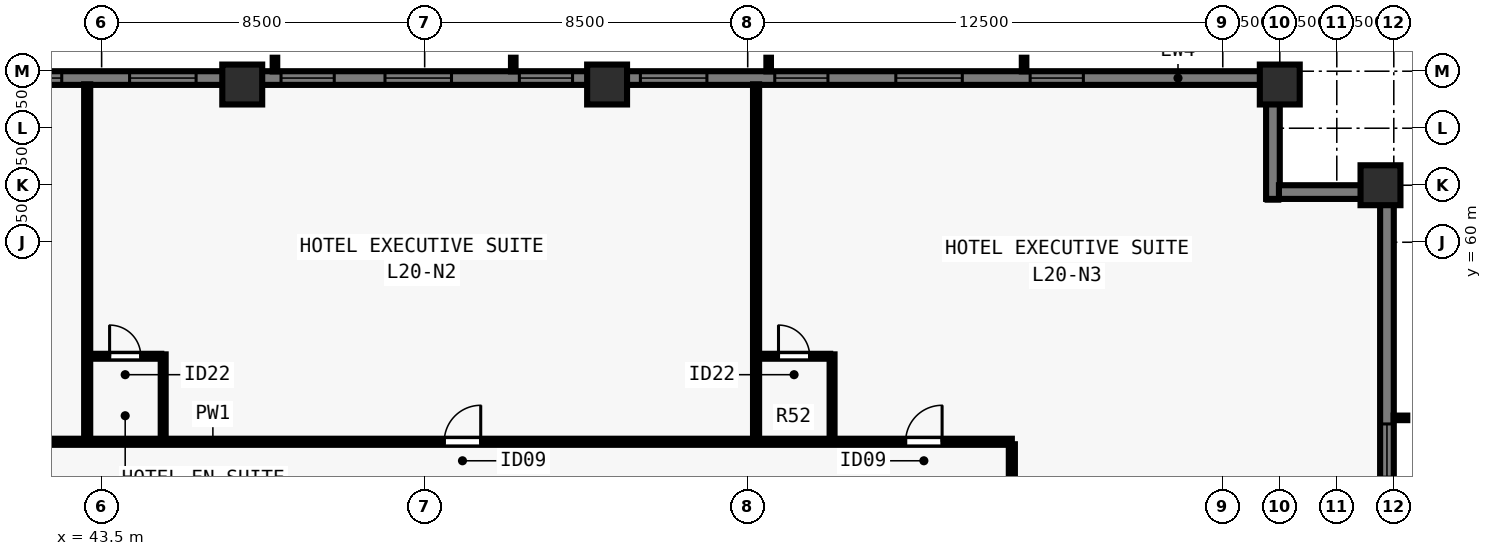
"""IFC4 building model, lengths in metres.
Left out: names, types, materials, properties, quantities, classifications, styles, units other than length and angle.
Written with IfcOpenShell. Run it as: python <this file> out.ifc"""

import sys

from ifc_helpers import new_model, si_unit, direction, frame, frame_2d, origin, origin_2d, place, context, subcontext, project, spatial, rectangle, extrude, element, fill, save


model = new_model("IFC4")
c1 = context("Model", 3, precision=1e-05, world=origin(), true_north=direction((0.0, 1.0)))
c2 = subcontext(c1, "Body", "Model", "MODEL_VIEW")
j1 = project(units=[si_unit("LENGTHUNIT", "METRE"), si_unit("PLANEANGLEUNIT", "RADIAN")], contexts=[c1])
p1 = place(None, origin())
s1 = spatial("IfcSite", under=j1, at=p1, CompositionType="ELEMENT")
p2 = place(p1, origin())
s2 = spatial("IfcBuilding", under=s1, at=p2, CompositionType="ELEMENT")
p3 = place(p2, frame((0.0, 0.0, 76.0)))
s3 = spatial("IfcBuildingStorey", under=s2, at=p3, CompositionType="ELEMENT", Elevation=76.0)
for number, where, z_axis, x_axis in (
    (1, (77.15, 61.5, 0.0), (0.0, 0.0, 1.0), (0.0, 1.0, 0.0)),
    (2, (74.5, 64.15, 0.0), (0.0, 0.0, 1.0), (1.0, 0.0, 0.0)),
    (3, (56.8, 64.15, 0.0), (0.0, 0.0, 1.0), (1.0, 0.0, 0.0)),
    (4, (47.2, 64.15, 0.0), (0.0, 0.0, 1.0), (1.0, 0.0, 0.0)),
):
    element("IfcColumn", number, at=place(p3, frame(where, z_axis=z_axis, x_axis=x_axis)), inside=s3, PredefinedType="COLUMN", context=c2, shape_type="SweptSolid", body=[
        extrude(rectangle(XDim=1.05, YDim=1.05, at=origin_2d()), origin(), (0.0, 0.0, 1.0), 3.5),
    ])
p4 = place(p3, frame((29.5, 64.32, 0.0), z_axis=(0.0, 0.0, 1.0), x_axis=(1.0, 0.0, 0.0)))
e5 = element("IfcWall", 5, at=p4, inside=s3, PredefinedType="SOLIDWALL", context=c2, shape_type="SweptSolid", body=[
    extrude(rectangle(XDim=44.662, YDim=0.36, at=frame_2d((22.331, 0.0))), origin(), (0.0, 0.0, 1.0), 3.28),
])
p5 = place(p4, frame((4.83, 0.0, 0.8)))
e6 = element("IfcOpeningElement", 6, at=p5, cuts=e5, PredefinedType="OPENING", context=c2, shape_type="SweptSolid", body=[
    extrude(rectangle(XDim=1.4, YDim=1.544, at=frame_2d((0.7, 0.772))), frame((0.0, 0.19, 0.0), z_axis=(0.0, -1.0, 0.0), x_axis=(1.0, 0.0, 0.0)), (0.0, 0.0, 1.0), 0.38),
])
p6 = place(p4, frame((8.015, 0.0, 0.8)))
e7 = element("IfcOpeningElement", 7, at=p6, cuts=e5, PredefinedType="OPENING", context=c2, shape_type="SweptSolid", body=[
    extrude(rectangle(XDim=1.75, YDim=1.544, at=frame_2d((0.875, 0.772))), frame((0.0, 0.19, 0.0), z_axis=(0.0, -1.0, 0.0), x_axis=(1.0, 0.0, 0.0)), (0.0, 0.0, 1.0), 0.38),
])
p7 = place(p4, frame((11.551, 0.0, 0.8)))
e8 = element("IfcOpeningElement", 8, at=p7, cuts=e5, PredefinedType="OPENING", context=c2, shape_type="SweptSolid", body=[
    extrude(rectangle(XDim=1.4, YDim=1.544, at=frame_2d((0.7, 0.772))), frame((0.0, 0.19, 0.0), z_axis=(0.0, -1.0, 0.0), x_axis=(1.0, 0.0, 0.0)), (0.0, 0.0, 1.0), 0.38),
])
p8 = place(p4, frame((14.736, 0.0, 0.8)))
e9 = element("IfcOpeningElement", 9, at=p8, cuts=e5, PredefinedType="OPENING", context=c2, shape_type="SweptSolid", body=[
    extrude(rectangle(XDim=1.75, YDim=1.544, at=frame_2d((0.875, 0.772))), frame((0.0, 0.19, 0.0), z_axis=(0.0, -1.0, 0.0), x_axis=(1.0, 0.0, 0.0)), (0.0, 0.0, 1.0), 0.38),
])
p9 = place(p4, frame((18.721, 0.0, 0.8)))
e10 = element("IfcOpeningElement", 10, at=p9, cuts=e5, PredefinedType="OPENING", context=c2, shape_type="SweptSolid", body=[
    extrude(rectangle(XDim=1.4, YDim=1.544, at=frame_2d((0.7, 0.772))), frame((0.0, 0.19, 0.0), z_axis=(0.0, -1.0, 0.0), x_axis=(1.0, 0.0, 0.0)), (0.0, 0.0, 1.0), 0.38),
])
p10 = place(p4, frame((21.456, 0.0, 0.8)))
e11 = element("IfcOpeningElement", 11, at=p10, cuts=e5, PredefinedType="OPENING", context=c2, shape_type="SweptSolid", body=[
    extrude(rectangle(XDim=1.75, YDim=1.544, at=frame_2d((0.875, 0.772))), frame((0.0, 0.19, 0.0), z_axis=(0.0, -1.0, 0.0), x_axis=(1.0, 0.0, 0.0)), (0.0, 0.0, 1.0), 0.38),
])
p11 = place(p4, frame((24.991, 0.0, 0.8)))
e12 = element("IfcOpeningElement", 12, at=p11, cuts=e5, PredefinedType="OPENING", context=c2, shape_type="SweptSolid", body=[
    extrude(rectangle(XDim=1.4, YDim=1.544, at=frame_2d((0.7, 0.772))), frame((0.0, 0.19, 0.0), z_axis=(0.0, -1.0, 0.0), x_axis=(1.0, 0.0, 0.0)), (0.0, 0.0, 1.0), 0.38),
])
p12 = place(p4, frame((28.177, 0.0, 0.8)))
e13 = element("IfcOpeningElement", 13, at=p12, cuts=e5, PredefinedType="OPENING", context=c2, shape_type="SweptSolid", body=[
    extrude(rectangle(XDim=1.75, YDim=1.544, at=frame_2d((0.875, 0.772))), frame((0.0, 0.19, 0.0), z_axis=(0.0, -1.0, 0.0), x_axis=(1.0, 0.0, 0.0)), (0.0, 0.0, 1.0), 0.38),
])
p13 = place(p4, frame((31.711, 0.0, 0.8)))
e14 = element("IfcOpeningElement", 14, at=p13, cuts=e5, PredefinedType="OPENING", context=c2, shape_type="SweptSolid", body=[
    extrude(rectangle(XDim=1.4, YDim=1.544, at=frame_2d((0.7, 0.772))), frame((0.0, 0.19, 0.0), z_axis=(0.0, -1.0, 0.0), x_axis=(1.0, 0.0, 0.0)), (0.0, 0.0, 1.0), 0.38),
])
p14 = place(p4, frame((34.897, 0.0, 0.8)))
e15 = element("IfcOpeningElement", 15, at=p14, cuts=e5, PredefinedType="OPENING", context=c2, shape_type="SweptSolid", body=[
    extrude(rectangle(XDim=1.75, YDim=1.544, at=frame_2d((0.875, 0.772))), frame((0.0, 0.19, 0.0), z_axis=(0.0, -1.0, 0.0), x_axis=(1.0, 0.0, 0.0)), (0.0, 0.0, 1.0), 0.38),
])
p15 = place(p4, frame((38.432, 0.0, 0.8)))
e16 = element("IfcOpeningElement", 16, at=p15, cuts=e5, PredefinedType="OPENING", context=c2, shape_type="SweptSolid", body=[
    extrude(rectangle(XDim=1.4, YDim=1.544, at=frame_2d((0.7, 0.772))), frame((0.0, 0.19, 0.0), z_axis=(0.0, -1.0, 0.0), x_axis=(1.0, 0.0, 0.0)), (0.0, 0.0, 1.0), 0.38),
])
p16 = place(p3, frame((74.32, 64.5, 0.0), z_axis=(0.0, 0.0, 1.0), x_axis=(0.0, -1.0, 0.0)))
e17 = element("IfcWall", 17, at=p16, inside=s3, PredefinedType="SOLIDWALL", context=c2, shape_type="SweptSolid", body=[
    extrude(rectangle(XDim=3.36, YDim=0.36, at=frame_2d((1.68, 0.0))), origin(), (0.0, 0.0, 1.0), 3.28),
])
p17 = place(p3, frame((74.478, 61.32, 0.0), z_axis=(0.0, 0.0, 1.0), x_axis=(1.0, 0.0, 0.0)))
e18 = element("IfcWall", 18, at=p17, inside=s3, PredefinedType="SOLIDWALL", context=c2, shape_type="SweptSolid", body=[
    extrude(rectangle(XDim=2.684, YDim=0.36, at=frame_2d((1.342, 0.0))), origin(), (0.0, 0.0, 1.0), 3.28),
])
p18 = place(p3, frame((77.32, 61.5, 0.0), z_axis=(0.0, 0.0, 1.0), x_axis=(0.0, -1.0, 0.0)))
e19 = element("IfcWall", 19, at=p18, inside=s3, PredefinedType="SOLIDWALL", context=c2, shape_type="SweptSolid", body=[
    extrude(rectangle(XDim=11.362, YDim=0.36, at=frame_2d((5.681, 0.0))), origin(), (0.0, 0.0, 1.0), 3.28),
])
p19 = place(p18, frame((6.281, 0.0, 0.8)))
e20 = element("IfcOpeningElement", 20, at=p19, cuts=e19, PredefinedType="OPENING", context=c2, shape_type="SweptSolid", body=[
    extrude(rectangle(XDim=1.4, YDim=1.544, at=frame_2d((0.7, 0.772))), frame((0.0, 0.19, 0.0), z_axis=(0.0, -1.0, 0.0), x_axis=(1.0, 0.0, 0.0)), (0.0, 0.0, 1.0), 0.38),
])
p20 = place(p3, frame((36.55, 54.75, 0.0), z_axis=(0.0, 0.0, 1.0), x_axis=(1.0, 0.0, 0.0)))
e21 = element("IfcWall", 21, at=p20, inside=s3, PredefinedType="PARTITIONING", context=c2, shape_type="SweptSolid", body=[
    extrude(rectangle(XDim=30.9, YDim=0.16, at=frame_2d((15.45, 0.0))), origin(), (0.0, 0.0, 1.0), 3.28),
])
p21 = place(p20, frame((2.83, 0.0, 0.0)))
e22 = element("IfcOpeningElement", 22, at=p21, cuts=e21, PredefinedType="OPENING", context=c2, shape_type="SweptSolid", body=[
    extrude(rectangle(XDim=0.96, YDim=2.15, at=frame_2d((0.48, 1.075))), frame((0.0, 0.09, 0.0), z_axis=(0.0, -1.0, 0.0), x_axis=(1.0, 0.0, 0.0)), (0.0, 0.0, 1.0), 0.18),
])
p22 = place(p20, frame((15.965, 0.0, 0.0)))
e23 = element("IfcOpeningElement", 23, at=p22, cuts=e21, PredefinedType="OPENING", context=c2, shape_type="SweptSolid", body=[
    extrude(rectangle(XDim=0.96, YDim=2.15, at=frame_2d((0.48, 1.075))), frame((0.0, 0.09, 0.0), z_axis=(0.0, -1.0, 0.0), x_axis=(1.0, 0.0, 0.0)), (0.0, 0.0, 1.0), 0.18),
])
p23 = place(p20, frame((28.105, 0.0, 0.0)))
e24 = element("IfcOpeningElement", 24, at=p23, cuts=e21, PredefinedType="OPENING", context=c2, shape_type="SweptSolid", body=[
    extrude(rectangle(XDim=0.96, YDim=2.15, at=frame_2d((0.48, 1.075))), frame((0.0, 0.09, 0.0), z_axis=(0.0, -1.0, 0.0), x_axis=(1.0, 0.0, 0.0)), (0.0, 0.0, 1.0), 0.18),
])
p24 = place(p3, frame((67.45, 23.315, 0.0), z_axis=(0.0, 0.0, 1.0), x_axis=(0.0, 1.0, 0.0)))
e25 = element("IfcWall", 25, at=p24, inside=s3, PredefinedType="PARTITIONING", context=c2, shape_type="SweptSolid", body=[
    extrude(rectangle(XDim=31.37, YDim=0.16, at=frame_2d((15.685, 0.0))), origin(), (0.0, 0.0, 1.0), 3.28),
])
p25 = place(p24, frame((8.474, 0.0, 0.0)))
e26 = element("IfcOpeningElement", 26, at=p25, cuts=e25, PredefinedType="OPENING", context=c2, shape_type="SweptSolid", body=[
    extrude(rectangle(XDim=0.96, YDim=2.15, at=frame_2d((0.48, 1.075))), frame((0.0, 0.09, 0.0), z_axis=(0.0, -1.0, 0.0), x_axis=(1.0, 0.0, 0.0)), (0.0, 0.0, 1.0), 0.18),
])
p26 = place(p24, frame((23.974, 0.0, 0.0)))
e27 = element("IfcOpeningElement", 27, at=p26, cuts=e25, PredefinedType="OPENING", context=c2, shape_type="SweptSolid", body=[
    extrude(rectangle(XDim=0.96, YDim=2.15, at=frame_2d((0.48, 1.075))), frame((0.0, 0.09, 0.0), z_axis=(0.0, -1.0, 0.0), x_axis=(1.0, 0.0, 0.0)), (0.0, 0.0, 1.0), 0.18),
])
p27 = place(p3, frame((43.12, 54.815, 0.0), z_axis=(0.0, 0.0, 1.0), x_axis=(0.0, 1.0, 0.0)))
e28 = element("IfcWall", 28, at=p27, inside=s3, PredefinedType="PARTITIONING", context=c2, shape_type="SweptSolid", body=[
    extrude(rectangle(XDim=9.34, YDim=0.16, at=frame_2d((4.67, 0.0))), origin(), (0.0, 0.0, 1.0), 3.28),
])
p28 = place(p3, frame((45.12, 54.815, 0.0), z_axis=(0.0, 0.0, 1.0), x_axis=(0.0, 1.0, 0.0)))
e29 = element("IfcWall", 29, at=p28, inside=s3, PredefinedType="PLUMBINGWALL", context=c2, shape_type="SweptSolid", body=[
    extrude(rectangle(XDim=2.235, YDim=0.13, at=frame_2d((1.118, 0.0))), origin(), (0.0, 0.0, 1.0), 3.28),
])
p29 = place(p3, frame((43.185, 57.0, 0.0), z_axis=(0.0, 0.0, 1.0), x_axis=(1.0, 0.0, 0.0)))
e30 = element("IfcWall", 30, at=p29, inside=s3, PredefinedType="PLUMBINGWALL", context=c2, shape_type="SweptSolid", body=[
    extrude(rectangle(XDim=1.885, YDim=0.13, at=frame_2d((0.942, 0.0))), origin(), (0.0, 0.0, 1.0), 3.28),
])
p30 = place(p29, frame((0.525, 0.0, 0.0)))
e31 = element("IfcOpeningElement", 31, at=p30, cuts=e30, PredefinedType="OPENING", context=c2, shape_type="SweptSolid", body=[
    extrude(rectangle(XDim=0.82, YDim=2.1, at=frame_2d((0.41, 1.05))), frame((0.0, 0.075, 0.0), z_axis=(0.0, -1.0, 0.0), x_axis=(1.0, 0.0, 0.0)), (0.0, 0.0, 1.0), 0.15),
])
p31 = place(p3, frame((60.72, 54.815, 0.0), z_axis=(0.0, 0.0, 1.0), x_axis=(0.0, 1.0, 0.0)))
e32 = element("IfcWall", 32, at=p31, inside=s3, PredefinedType="PARTITIONING", context=c2, shape_type="SweptSolid", body=[
    extrude(rectangle(XDim=9.34, YDim=0.16, at=frame_2d((4.67, 0.0))), origin(), (0.0, 0.0, 1.0), 3.28),
])
p32 = place(p3, frame((62.72, 54.815, 0.0), z_axis=(0.0, 0.0, 1.0), x_axis=(0.0, 1.0, 0.0)))
e33 = element("IfcWall", 33, at=p32, inside=s3, PredefinedType="PLUMBINGWALL", context=c2, shape_type="SweptSolid", body=[
    extrude(rectangle(XDim=2.235, YDim=0.13, at=frame_2d((1.118, 0.0))), origin(), (0.0, 0.0, 1.0), 3.28),
])
p33 = place(p3, frame((60.785, 57.0, 0.0), z_axis=(0.0, 0.0, 1.0), x_axis=(1.0, 0.0, 0.0)))
e34 = element("IfcWall", 34, at=p33, inside=s3, PredefinedType="PLUMBINGWALL", context=c2, shape_type="SweptSolid", body=[
    extrude(rectangle(XDim=1.885, YDim=0.13, at=frame_2d((0.942, 0.0))), origin(), (0.0, 0.0, 1.0), 3.28),
])
p34 = place(p33, frame((0.525, 0.0, 0.0)))
e35 = element("IfcOpeningElement", 35, at=p34, cuts=e34, PredefinedType="OPENING", context=c2, shape_type="SweptSolid", body=[
    extrude(rectangle(XDim=0.82, YDim=2.1, at=frame_2d((0.41, 1.05))), frame((0.0, 0.075, 0.0), z_axis=(0.0, -1.0, 0.0), x_axis=(1.0, 0.0, 0.0)), (0.0, 0.0, 1.0), 0.15),
])
p35 = place(p7, origin())
e36 = element("IfcWindow", 36, at=p35, inside=s3, PartitioningType="SINGLE_PANEL", PredefinedType="WINDOW", context=c2, shape_type="SweptSolid", body=[
    extrude(rectangle(XDim=1.4, YDim=1.544, at=frame_2d((0.7, 0.772))), frame((0.0, -0.05, 0.0), z_axis=(0.0, -1.0, 0.0), x_axis=(1.0, 0.0, 0.0)), (0.0, 0.0, 1.0), 0.06),
])
fill(e8, e36)
p36 = place(p8, origin())
e37 = element("IfcWindow", 37, at=p36, inside=s3, PartitioningType="SINGLE_PANEL", PredefinedType="WINDOW", context=c2, shape_type="SweptSolid", body=[
    extrude(rectangle(XDim=1.75, YDim=1.544, at=frame_2d((0.875, 0.772))), frame((0.0, -0.05, 0.0), z_axis=(0.0, -1.0, 0.0), x_axis=(1.0, 0.0, 0.0)), (0.0, 0.0, 1.0), 0.06),
])
fill(e9, e37)
p37 = place(p9, origin())
e38 = element("IfcWindow", 38, at=p37, inside=s3, PartitioningType="SINGLE_PANEL", PredefinedType="WINDOW", context=c2, shape_type="SweptSolid", body=[
    extrude(rectangle(XDim=1.4, YDim=1.544, at=frame_2d((0.7, 0.772))), frame((0.0, -0.05, 0.0), z_axis=(0.0, -1.0, 0.0), x_axis=(1.0, 0.0, 0.0)), (0.0, 0.0, 1.0), 0.06),
])
fill(e10, e38)
p38 = place(p10, origin())
e39 = element("IfcWindow", 39, at=p38, inside=s3, PartitioningType="SINGLE_PANEL", PredefinedType="WINDOW", context=c2, shape_type="SweptSolid", body=[
    extrude(rectangle(XDim=1.75, YDim=1.544, at=frame_2d((0.875, 0.772))), frame((0.0, -0.05, 0.0), z_axis=(0.0, -1.0, 0.0), x_axis=(1.0, 0.0, 0.0)), (0.0, 0.0, 1.0), 0.06),
])
fill(e11, e39)
p39 = place(p11, origin())
e40 = element("IfcWindow", 40, at=p39, inside=s3, PartitioningType="SINGLE_PANEL", PredefinedType="WINDOW", context=c2, shape_type="SweptSolid", body=[
    extrude(rectangle(XDim=1.4, YDim=1.544, at=frame_2d((0.7, 0.772))), frame((0.0, -0.05, 0.0), z_axis=(0.0, -1.0, 0.0), x_axis=(1.0, 0.0, 0.0)), (0.0, 0.0, 1.0), 0.06),
])
fill(e12, e40)
p40 = place(p12, origin())
e41 = element("IfcWindow", 41, at=p40, inside=s3, PartitioningType="SINGLE_PANEL", PredefinedType="WINDOW", context=c2, shape_type="SweptSolid", body=[
    extrude(rectangle(XDim=1.75, YDim=1.544, at=frame_2d((0.875, 0.772))), frame((0.0, -0.05, 0.0), z_axis=(0.0, -1.0, 0.0), x_axis=(1.0, 0.0, 0.0)), (0.0, 0.0, 1.0), 0.06),
])
fill(e13, e41)
p41 = place(p13, origin())
e42 = element("IfcWindow", 42, at=p41, inside=s3, PartitioningType="SINGLE_PANEL", PredefinedType="WINDOW", context=c2, shape_type="SweptSolid", body=[
    extrude(rectangle(XDim=1.4, YDim=1.544, at=frame_2d((0.7, 0.772))), frame((0.0, -0.05, 0.0), z_axis=(0.0, -1.0, 0.0), x_axis=(1.0, 0.0, 0.0)), (0.0, 0.0, 1.0), 0.06),
])
fill(e14, e42)
p42 = place(p14, origin())
e43 = element("IfcWindow", 43, at=p42, inside=s3, PartitioningType="SINGLE_PANEL", PredefinedType="WINDOW", context=c2, shape_type="SweptSolid", body=[
    extrude(rectangle(XDim=1.75, YDim=1.544, at=frame_2d((0.875, 0.772))), frame((0.0, -0.05, 0.0), z_axis=(0.0, -1.0, 0.0), x_axis=(1.0, 0.0, 0.0)), (0.0, 0.0, 1.0), 0.06),
])
fill(e15, e43)
p43 = place(p15, origin())
e44 = element("IfcWindow", 44, at=p43, inside=s3, PartitioningType="SINGLE_PANEL", PredefinedType="WINDOW", context=c2, shape_type="SweptSolid", body=[
    extrude(rectangle(XDim=1.4, YDim=1.544, at=frame_2d((0.7, 0.772))), frame((0.0, -0.05, 0.0), z_axis=(0.0, -1.0, 0.0), x_axis=(1.0, 0.0, 0.0)), (0.0, 0.0, 1.0), 0.06),
])
fill(e16, e44)
p44 = place(p19, origin())
e45 = element("IfcWindow", 45, at=p44, inside=s3, PartitioningType="SINGLE_PANEL", PredefinedType="WINDOW", context=c2, shape_type="SweptSolid", body=[
    extrude(rectangle(XDim=1.4, YDim=1.544, at=frame_2d((0.7, 0.772))), frame((0.0, -0.05, 0.0), z_axis=(0.0, -1.0, 0.0), x_axis=(1.0, 0.0, 0.0)), (0.0, 0.0, 1.0), 0.06),
])
fill(e20, e45)
p45 = place(p30, origin())
e46 = element("IfcDoor", 46, at=p45, inside=s3, OperationType="SINGLE_SWING_LEFT", PredefinedType="DOOR", context=c2, shape_type="SweptSolid", body=[
    extrude(rectangle(XDim=0.82, YDim=2.1, at=frame_2d((0.41, 1.05))), frame((0.0, 0.025, 0.0), z_axis=(0.0, -1.0, 0.0), x_axis=(1.0, 0.0, 0.0)), (0.0, 0.0, 1.0), 0.05),
])
fill(e31, e46)
p46 = place(p22, origin())
e47 = element("IfcDoor", 47, at=p46, inside=s3, OperationType="SINGLE_SWING_RIGHT", PredefinedType="DOOR", context=c2, shape_type="SweptSolid", body=[
    extrude(rectangle(XDim=0.96, YDim=2.15, at=frame_2d((0.48, 1.075))), frame((0.0, 0.025, 0.0), z_axis=(0.0, -1.0, 0.0), x_axis=(1.0, 0.0, 0.0)), (0.0, 0.0, 1.0), 0.05),
])
fill(e23, e47)
p47 = place(p34, origin())
e48 = element("IfcDoor", 48, at=p47, inside=s3, OperationType="SINGLE_SWING_LEFT", PredefinedType="DOOR", context=c2, shape_type="SweptSolid", body=[
    extrude(rectangle(XDim=0.82, YDim=2.1, at=frame_2d((0.41, 1.05))), frame((0.0, 0.025, 0.0), z_axis=(0.0, -1.0, 0.0), x_axis=(1.0, 0.0, 0.0)), (0.0, 0.0, 1.0), 0.05),
])
fill(e35, e48)
p48 = place(p23, origin())
e49 = element("IfcDoor", 49, at=p48, inside=s3, OperationType="SINGLE_SWING_RIGHT", PredefinedType="DOOR", context=c2, shape_type="SweptSolid", body=[
    extrude(rectangle(XDim=0.96, YDim=2.15, at=frame_2d((0.48, 1.075))), frame((0.0, 0.025, 0.0), z_axis=(0.0, -1.0, 0.0), x_axis=(1.0, 0.0, 0.0)), (0.0, 0.0, 1.0), 0.05),
])
fill(e24, e49)
save(model, sys.argv[1])
